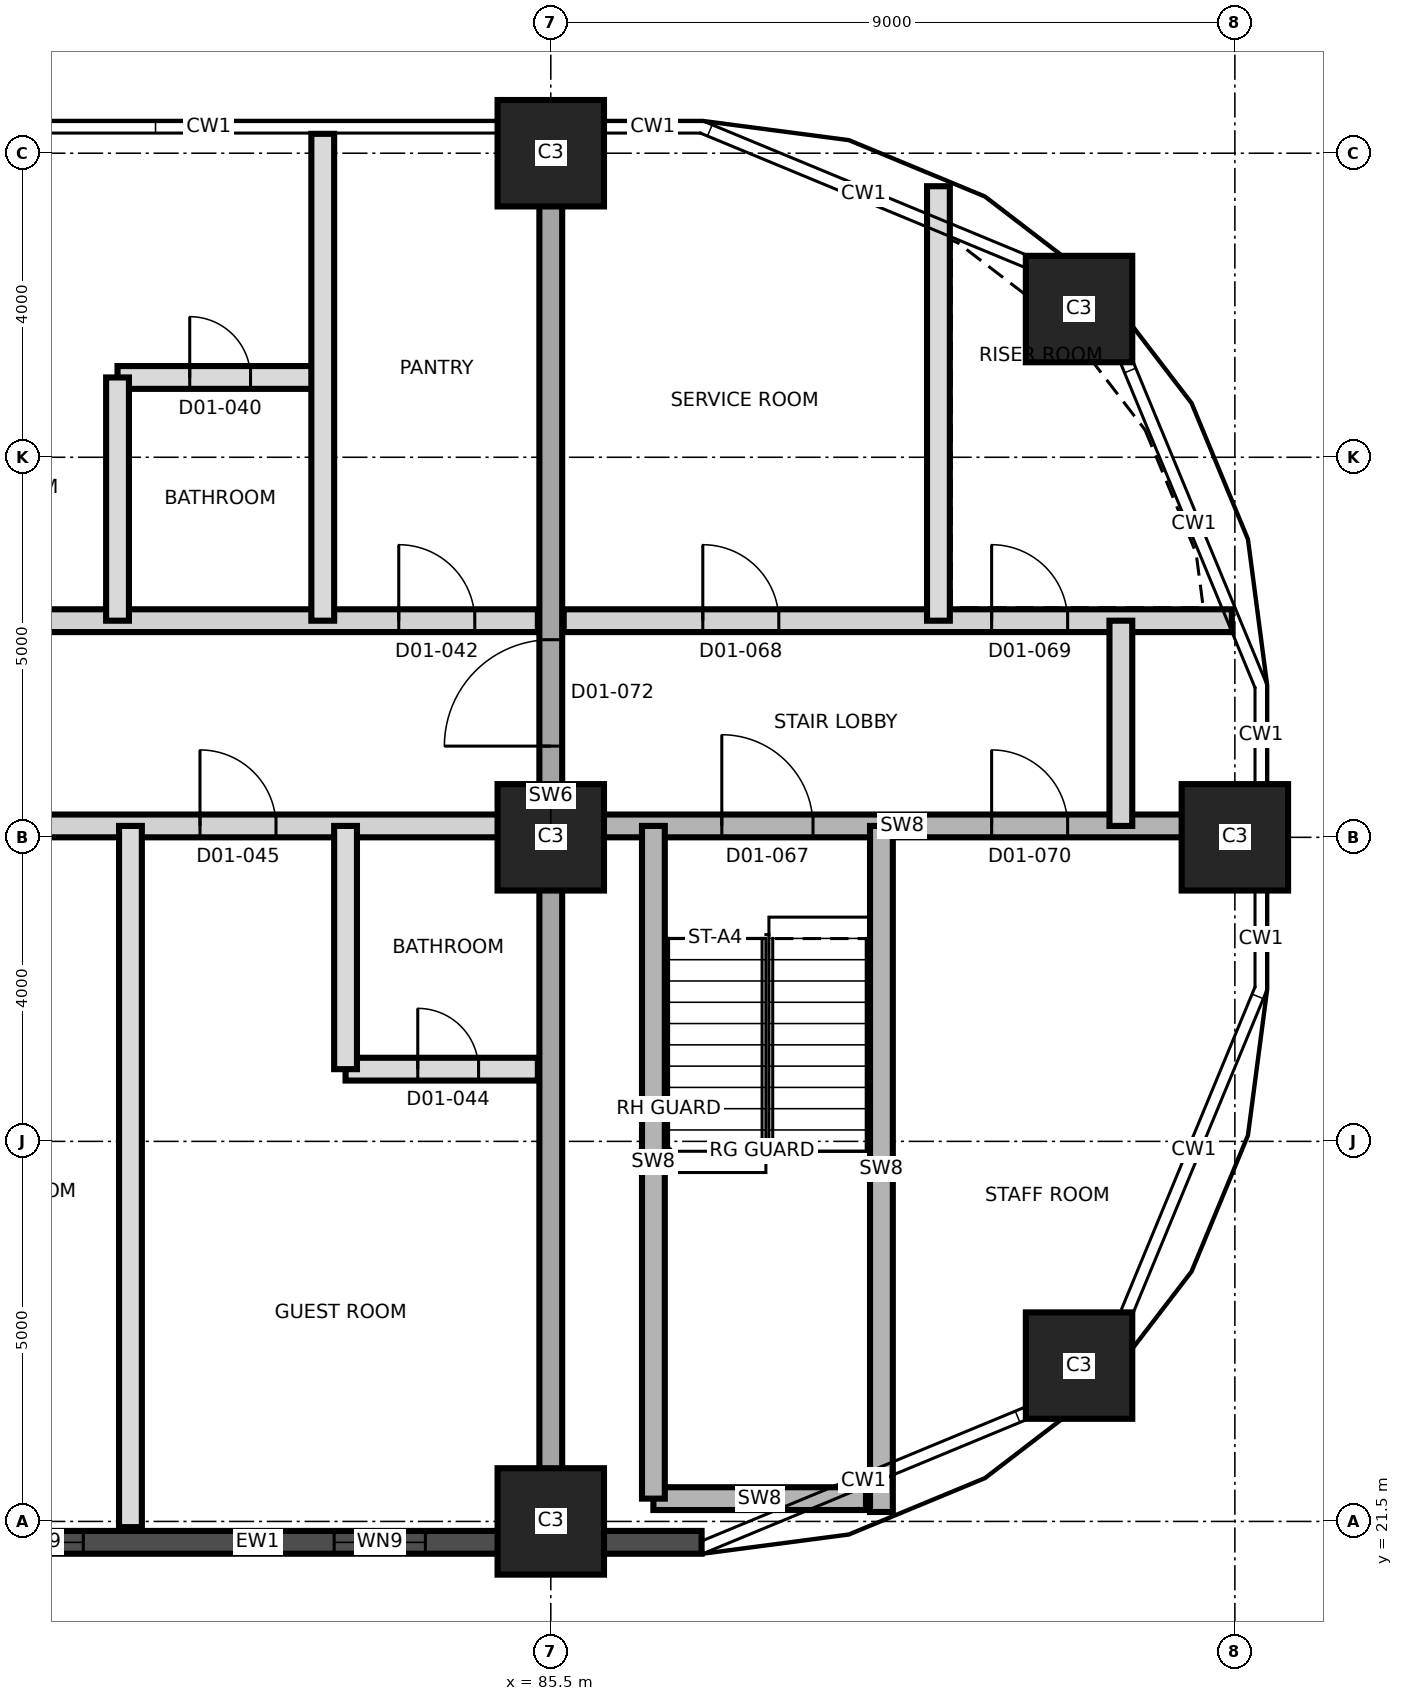
"""IFC4 building model, lengths in metres.
Left out: names, types, materials, properties, quantities, classifications, styles, units other than length and angle.
Written with IfcOpenShell. Run it as: python <this file> out.ifc"""

import sys

from ifc_helpers import new_model, si_unit, direction, frame, frame_2d, origin, origin_2d, place, context, subcontext, project, spatial, rectangle, extrude, element, fill, save


model = new_model("IFC4")
c1 = context("Model", 3, precision=1e-05, world=origin(), true_north=direction((0.0, 1.0)))
c2 = subcontext(c1, "Body", "Model", "MODEL_VIEW")
j1 = project(units=[si_unit("LENGTHUNIT", "METRE"), si_unit("PLANEANGLEUNIT", "RADIAN")], contexts=[c1])
p1 = place(None, origin())
s1 = spatial("IfcSite", under=j1, at=p1, CompositionType="ELEMENT")
p2 = place(p1, origin())
s2 = spatial("IfcBuilding", under=s1, at=p2, CompositionType="ELEMENT")
p3 = place(p2, frame((0.0, 0.0, 40.9)))
s3 = spatial("IfcBuildingStorey", under=s2, at=p3, CompositionType="ELEMENT", Elevation=40.9)
for number, where, z_axis, x_axis in (
    (1, (85.5, 21.5, 0.0), (0.0, 0.0, 1.0), (1.0, 0.0, 0.0)),
    (2, (92.45, 23.55, 0.0), (0.0, 0.0, 1.0), (1.0, 0.0, 0.0)),
    (3, (85.5, 30.5, 0.0), (0.0, 0.0, 1.0), (1.0, 0.0, 0.0)),
    (4, (94.5, 30.5, 0.0), (0.0, 0.0, 1.0), (1.0, 0.0, 0.0)),
    (5, (92.45, 37.45, 0.0), (0.0, 0.0, 1.0), (1.0, 0.0, 0.0)),
    (6, (85.5, 39.5, 0.0), (0.0, 0.0, 1.0), (1.0, 0.0, 0.0)),
):
    element("IfcColumn", number, at=place(p3, frame(where, z_axis=z_axis, x_axis=x_axis)), inside=s3, PredefinedType="COLUMN", context=c2, shape_type="SweptSolid", body=[
        extrude(rectangle(XDim=1.4, YDim=1.4, at=origin_2d()), origin(), (0.0, 0.0, 1.0), 3.7),
    ])
p4 = place(p3, frame((85.5, 21.425, 0.0), z_axis=(0.0, 0.0, 1.0), x_axis=(0.0, 1.0, 0.0)))
e7 = element("IfcWall", 7, at=p4, inside=s3, PredefinedType="SHEAR", context=c2, shape_type="SweptSolid", body=[
    extrude(rectangle(XDim=18.15, YDim=0.3, at=frame_2d((9.075, 0.0))), origin(), (0.0, 0.0, 1.0), 3.7),
])
p5 = place(p4, frame((10.275, 0.0, 0.0)))
e8 = element("IfcOpeningElement", 8, at=p5, cuts=e7, PredefinedType="OPENING", context=c2, shape_type="SweptSolid", body=[
    extrude(rectangle(XDim=1.4, YDim=2.1, at=frame_2d((0.7, 1.05))), frame((0.0, 0.16, 0.0), z_axis=(0.0, -1.0, 0.0), x_axis=(1.0, 0.0, 0.0)), (0.0, 0.0, 1.0), 0.32),
])
p6 = place(p3, frame((75.8, 21.225, 0.0), z_axis=(0.0, 0.0, 1.0), x_axis=(1.0, 0.0, 0.0)))
e9 = element("IfcWall", 9, at=p6, inside=s3, PredefinedType="SOLIDWALL", context=c2, shape_type="SweptSolid", body=[
    extrude(rectangle(XDim=11.684, YDim=0.3, at=frame_2d((5.842, 0.0))), origin(), (0.0, 0.0, 1.0), 3.4),
])
p7 = place(p6, frame((2.35, 0.0, 0.9)))
e10 = element("IfcOpeningElement", 10, at=p7, cuts=e9, PredefinedType="OPENING", context=c2, shape_type="SweptSolid", body=[
    extrude(rectangle(XDim=1.2, YDim=1.5, at=frame_2d((0.6, 0.75))), frame((0.0, 0.16, 0.0), z_axis=(0.0, -1.0, 0.0), x_axis=(1.0, 0.0, 0.0)), (0.0, 0.0, 1.0), 0.32),
])
p8 = place(p6, frame((6.85, 0.0, 0.9)))
e11 = element("IfcOpeningElement", 11, at=p8, cuts=e9, PredefinedType="OPENING", context=c2, shape_type="SweptSolid", body=[
    extrude(rectangle(XDim=1.2, YDim=1.5, at=frame_2d((0.6, 0.75))), frame((0.0, 0.16, 0.0), z_axis=(0.0, -1.0, 0.0), x_axis=(1.0, 0.0, 0.0)), (0.0, 0.0, 1.0), 0.32),
])
p9 = place(p3, frame((86.85, 21.8, 0.0), z_axis=(0.0, 0.0, 1.0), x_axis=(1.0, 0.0, 0.0)))
e12 = element("IfcWall", 12, at=p9, inside=s3, PredefinedType="SHEAR", context=c2, shape_type="SweptSolid", body=[
    extrude(rectangle(XDim=2.797, YDim=0.3, at=frame_2d((1.398, 0.0))), origin(), (0.0, 0.0, 1.0), 3.4),
])
p10 = place(p3, frame((82.8, 27.45, 0.0), z_axis=(0.0, 0.0, 1.0), x_axis=(1.0, 0.0, 0.0)))
e13 = element("IfcWall", 13, at=p10, inside=s3, PredefinedType="PARTITIONING", context=c2, shape_type="SweptSolid", body=[
    extrude(rectangle(XDim=2.53, YDim=0.3, at=frame_2d((1.265, 0.0))), origin(), (0.0, 0.0, 1.0), 3.4),
])
p11 = place(p10, frame((0.95, 0.0, 0.0)))
e14 = element("IfcOpeningElement", 14, at=p11, cuts=e13, PredefinedType="OPENING", context=c2, shape_type="SweptSolid", body=[
    extrude(rectangle(XDim=0.8, YDim=2.1, at=frame_2d((0.4, 1.05))), frame((0.0, 0.16, 0.0), z_axis=(0.0, -1.0, 0.0), x_axis=(1.0, 0.0, 0.0)), (0.0, 0.0, 1.0), 0.32),
])
p12 = place(p3, frame((58.95, 30.65, 0.0), z_axis=(0.0, 0.0, 1.0), x_axis=(1.0, 0.0, 0.0)))
e15 = element("IfcWall", 15, at=p12, inside=s3, PredefinedType="PARTITIONING", context=c2, shape_type="SweptSolid", body=[
    extrude(rectangle(XDim=26.38, YDim=0.3, at=frame_2d((13.19, 0.0))), origin(), (0.0, 0.0, 1.0), 3.4),
])
p13 = place(p12, frame((2.47, 0.0, 0.0)))
e16 = element("IfcOpeningElement", 16, at=p13, cuts=e15, PredefinedType="OPENING", context=c2, shape_type="SweptSolid", body=[
    extrude(rectangle(XDim=1.0, YDim=2.1, at=frame_2d((0.5, 1.05))), frame((0.0, 0.16, 0.0), z_axis=(0.0, -1.0, 0.0), x_axis=(1.0, 0.0, 0.0)), (0.0, 0.0, 1.0), 0.32),
])
p14 = place(p12, frame((4.27, 0.0, 0.0)))
e17 = element("IfcOpeningElement", 17, at=p14, cuts=e15, PredefinedType="OPENING", context=c2, shape_type="SweptSolid", body=[
    extrude(rectangle(XDim=1.0, YDim=2.1, at=frame_2d((0.5, 1.05))), frame((0.0, 0.16, 0.0), z_axis=(0.0, -1.0, 0.0), x_axis=(1.0, 0.0, 0.0)), (0.0, 0.0, 1.0), 0.32),
])
p15 = place(p12, frame((11.8, 0.0, 0.0)))
e18 = element("IfcOpeningElement", 18, at=p15, cuts=e15, PredefinedType="OPENING", context=c2, shape_type="SweptSolid", body=[
    extrude(rectangle(XDim=1.0, YDim=2.4, at=frame_2d((0.5, 1.2))), frame((0.0, 0.16, 0.0), z_axis=(0.0, -1.0, 0.0), x_axis=(1.0, 0.0, 0.0)), (0.0, 0.0, 1.0), 0.32),
])
p16 = place(p12, frame((13.3, 0.0, 0.0)))
e19 = element("IfcOpeningElement", 19, at=p16, cuts=e15, PredefinedType="OPENING", context=c2, shape_type="SweptSolid", body=[
    extrude(rectangle(XDim=1.0, YDim=2.4, at=frame_2d((0.5, 1.2))), frame((0.0, 0.16, 0.0), z_axis=(0.0, -1.0, 0.0), x_axis=(1.0, 0.0, 0.0)), (0.0, 0.0, 1.0), 0.32),
])
p17 = place(p12, frame((18.685, 0.0, 0.0)))
e20 = element("IfcOpeningElement", 20, at=p17, cuts=e15, PredefinedType="OPENING", context=c2, shape_type="SweptSolid", body=[
    extrude(rectangle(XDim=1.2, YDim=2.1, at=frame_2d((0.6, 1.05))), frame((0.0, 0.16, 0.0), z_axis=(0.0, -1.0, 0.0), x_axis=(1.0, 0.0, 0.0)), (0.0, 0.0, 1.0), 0.32),
])
p18 = place(p12, frame((21.935, 0.0, 0.0)))
e21 = element("IfcOpeningElement", 21, at=p18, cuts=e15, PredefinedType="OPENING", context=c2, shape_type="SweptSolid", body=[
    extrude(rectangle(XDim=1.0, YDim=2.1, at=frame_2d((0.5, 1.05))), frame((0.0, 0.16, 0.0), z_axis=(0.0, -1.0, 0.0), x_axis=(1.0, 0.0, 0.0)), (0.0, 0.0, 1.0), 0.32),
])
p19 = place(p3, frame((85.67, 30.65, 0.0), z_axis=(0.0, 0.0, 1.0), x_axis=(1.0, 0.0, 0.0)))
e22 = element("IfcWall", 22, at=p19, inside=s3, PredefinedType="SHEAR", context=c2, shape_type="SweptSolid", body=[
    extrude(rectangle(XDim=8.905, YDim=0.3, at=frame_2d((4.453, 0.0))), origin(), (0.0, 0.0, 1.0), 3.4),
])
p20 = place(p19, frame((2.08, 0.0, 0.0)))
e23 = element("IfcOpeningElement", 23, at=p20, cuts=e22, PredefinedType="OPENING", context=c2, shape_type="SweptSolid", body=[
    extrude(rectangle(XDim=1.2, YDim=2.1, at=frame_2d((0.6, 1.05))), frame((0.0, 0.16, 0.0), z_axis=(0.0, -1.0, 0.0), x_axis=(1.0, 0.0, 0.0)), (0.0, 0.0, 1.0), 0.32),
])
p21 = place(p19, frame((5.63, 0.0, 0.0)))
e24 = element("IfcOpeningElement", 24, at=p21, cuts=e22, PredefinedType="OPENING", context=c2, shape_type="SweptSolid", body=[
    extrude(rectangle(XDim=1.0, YDim=2.1, at=frame_2d((0.5, 1.05))), frame((0.0, 0.16, 0.0), z_axis=(0.0, -1.0, 0.0), x_axis=(1.0, 0.0, 0.0)), (0.0, 0.0, 1.0), 0.32),
])
p22 = place(p3, frame((58.95, 33.35, 0.0), z_axis=(0.0, 0.0, 1.0), x_axis=(1.0, 0.0, 0.0)))
e25 = element("IfcWall", 25, at=p22, inside=s3, PredefinedType="PARTITIONING", context=c2, shape_type="SweptSolid", body=[
    extrude(rectangle(XDim=26.38, YDim=0.3, at=frame_2d((13.19, 0.0))), origin(), (0.0, 0.0, 1.0), 3.4),
])
p23 = place(p22, frame((1.9, 0.0, 0.0)))
e26 = element("IfcOpeningElement", 26, at=p23, cuts=e25, PredefinedType="OPENING", context=c2, shape_type="SweptSolid", body=[
    extrude(rectangle(XDim=1.0, YDim=2.4, at=frame_2d((0.5, 1.2))), frame((0.0, 0.16, 0.0), z_axis=(0.0, -1.0, 0.0), x_axis=(1.0, 0.0, 0.0)), (0.0, 0.0, 1.0), 0.32),
])
p24 = place(p22, frame((9.7, 0.0, 0.0)))
e27 = element("IfcOpeningElement", 27, at=p24, cuts=e25, PredefinedType="OPENING", context=c2, shape_type="SweptSolid", body=[
    extrude(rectangle(XDim=1.0, YDim=2.1, at=frame_2d((0.5, 1.05))), frame((0.0, 0.16, 0.0), z_axis=(0.0, -1.0, 0.0), x_axis=(1.0, 0.0, 0.0)), (0.0, 0.0, 1.0), 0.32),
])
p25 = place(p22, frame((15.55, 0.0, 0.0)))
e28 = element("IfcOpeningElement", 28, at=p25, cuts=e25, PredefinedType="OPENING", context=c2, shape_type="SweptSolid", body=[
    extrude(rectangle(XDim=1.0, YDim=2.1, at=frame_2d((0.5, 1.05))), frame((0.0, 0.16, 0.0), z_axis=(0.0, -1.0, 0.0), x_axis=(1.0, 0.0, 0.0)), (0.0, 0.0, 1.0), 0.32),
])
p26 = place(p22, frame((18.7, 0.0, 0.0)))
e29 = element("IfcOpeningElement", 29, at=p26, cuts=e25, PredefinedType="OPENING", context=c2, shape_type="SweptSolid", body=[
    extrude(rectangle(XDim=1.0, YDim=2.1, at=frame_2d((0.5, 1.05))), frame((0.0, 0.16, 0.0), z_axis=(0.0, -1.0, 0.0), x_axis=(1.0, 0.0, 0.0)), (0.0, 0.0, 1.0), 0.32),
])
p27 = place(p22, frame((24.55, 0.0, 0.0)))
e30 = element("IfcOpeningElement", 30, at=p27, cuts=e25, PredefinedType="OPENING", context=c2, shape_type="SweptSolid", body=[
    extrude(rectangle(XDim=1.0, YDim=2.1, at=frame_2d((0.5, 1.05))), frame((0.0, 0.16, 0.0), z_axis=(0.0, -1.0, 0.0), x_axis=(1.0, 0.0, 0.0)), (0.0, 0.0, 1.0), 0.32),
])
p28 = place(p3, frame((85.67, 33.35, 0.0), z_axis=(0.0, 0.0, 1.0), x_axis=(1.0, 0.0, 0.0)))
e31 = element("IfcWall", 31, at=p28, inside=s3, PredefinedType="PARTITIONING", context=c2, shape_type="SweptSolid", body=[
    extrude(rectangle(XDim=8.79, YDim=0.3, at=frame_2d((4.395, 0.0))), origin(), (0.0, 0.0, 1.0), 3.4),
])
p29 = place(p28, frame((1.83, 0.0, 0.0)))
e32 = element("IfcOpeningElement", 32, at=p29, cuts=e31, PredefinedType="OPENING", context=c2, shape_type="SweptSolid", body=[
    extrude(rectangle(XDim=1.0, YDim=2.1, at=frame_2d((0.5, 1.05))), frame((0.0, 0.16, 0.0), z_axis=(0.0, -1.0, 0.0), x_axis=(1.0, 0.0, 0.0)), (0.0, 0.0, 1.0), 0.32),
])
p30 = place(p28, frame((5.63, 0.0, 0.0)))
e33 = element("IfcOpeningElement", 33, at=p30, cuts=e31, PredefinedType="OPENING", context=c2, shape_type="SweptSolid", body=[
    extrude(rectangle(XDim=1.0, YDim=2.1, at=frame_2d((0.5, 1.05))), frame((0.0, 0.16, 0.0), z_axis=(0.0, -1.0, 0.0), x_axis=(1.0, 0.0, 0.0)), (0.0, 0.0, 1.0), 0.32),
])
p31 = place(p3, frame((79.8, 36.55, 0.0), z_axis=(0.0, 0.0, 1.0), x_axis=(1.0, 0.0, 0.0)))
e34 = element("IfcWall", 34, at=p31, inside=s3, PredefinedType="PARTITIONING", context=c2, shape_type="SweptSolid", body=[
    extrude(rectangle(XDim=2.7, YDim=0.3, at=frame_2d((1.35, 0.0))), origin(), (0.0, 0.0, 1.0), 3.4),
])
p32 = place(p31, frame((0.95, 0.0, 0.0)))
e35 = element("IfcOpeningElement", 35, at=p32, cuts=e34, PredefinedType="OPENING", context=c2, shape_type="SweptSolid", body=[
    extrude(rectangle(XDim=0.8, YDim=2.1, at=frame_2d((0.4, 1.05))), frame((0.0, 0.16, 0.0), z_axis=(0.0, -1.0, 0.0), x_axis=(1.0, 0.0, 0.0)), (0.0, 0.0, 1.0), 0.32),
])
p33 = place(p3, frame((79.8, 33.35, 0.0), z_axis=(0.0, 0.0, 1.0), x_axis=(0.0, 1.0, 0.0)))
e36 = element("IfcWall", 36, at=p33, inside=s3, PredefinedType="PARTITIONING", context=c2, shape_type="SweptSolid", body=[
    extrude(rectangle(XDim=3.2, YDim=0.3, at=frame_2d((1.6, 0.0))), origin(), (0.0, 0.0, 1.0), 3.4),
])
p34 = place(p3, frame((79.97, 21.425, 0.0), z_axis=(0.0, 0.0, 1.0), x_axis=(0.0, 1.0, 0.0)))
e37 = element("IfcWall", 37, at=p34, inside=s3, PredefinedType="PARTITIONING", context=c2, shape_type="SweptSolid", body=[
    extrude(rectangle(XDim=9.225, YDim=0.3, at=frame_2d((4.612, 0.0))), origin(), (0.0, 0.0, 1.0), 3.4),
])
p35 = place(p3, frame((82.5, 33.35, 0.0), z_axis=(0.0, 0.0, 1.0), x_axis=(0.0, 1.0, 0.0)))
e38 = element("IfcWall", 38, at=p35, inside=s3, PredefinedType="PARTITIONING", context=c2, shape_type="SweptSolid", body=[
    extrude(rectangle(XDim=6.405, YDim=0.3, at=frame_2d((3.202, 0.0))), origin(), (0.0, 0.0, 1.0), 3.4),
])
p36 = place(p3, frame((82.8, 27.45, 0.0), z_axis=(0.0, 0.0, 1.0), x_axis=(0.0, 1.0, 0.0)))
e39 = element("IfcWall", 39, at=p36, inside=s3, PredefinedType="PARTITIONING", context=c2, shape_type="SweptSolid", body=[
    extrude(rectangle(XDim=3.2, YDim=0.3, at=frame_2d((1.6, 0.0))), origin(), (0.0, 0.0, 1.0), 3.4),
])
p37 = place(p3, frame((86.85, 21.8, 0.0), z_axis=(0.0, 0.0, 1.0), x_axis=(0.0, 1.0, 0.0)))
e40 = element("IfcWall", 40, at=p37, inside=s3, PredefinedType="SHEAR", context=c2, shape_type="SweptSolid", body=[
    extrude(rectangle(XDim=8.85, YDim=0.3, at=frame_2d((4.425, 0.0))), origin(), (0.0, 0.0, 1.0), 3.4),
])
p38 = place(p3, frame((89.85, 21.624, 0.0), z_axis=(0.0, 0.0, 1.0), x_axis=(0.0, 1.0, 0.0)))
e41 = element("IfcWall", 41, at=p38, inside=s3, PredefinedType="SHEAR", context=c2, shape_type="SweptSolid", body=[
    extrude(rectangle(XDim=9.026, YDim=0.3, at=frame_2d((4.513, 0.0))), origin(), (0.0, 0.0, 1.0), 3.4),
])
p39 = place(p3, frame((90.6, 33.35, 0.0), z_axis=(0.0, 0.0, 1.0), x_axis=(0.0, 1.0, 0.0)))
e42 = element("IfcWall", 42, at=p39, inside=s3, PredefinedType="PARTITIONING", context=c2, shape_type="SweptSolid", body=[
    extrude(rectangle(XDim=5.716, YDim=0.3, at=frame_2d((2.858, 0.0))), origin(), (0.0, 0.0, 1.0), 3.4),
])
p40 = place(p3, frame((93.0, 30.65, 0.0), z_axis=(0.0, 0.0, 1.0), x_axis=(0.0, 1.0, 0.0)))
e43 = element("IfcWall", 43, at=p40, inside=s3, PredefinedType="PARTITIONING", context=c2, shape_type="SweptSolid", body=[
    extrude(rectangle(XDim=2.7, YDim=0.3, at=frame_2d((1.35, 0.0))), origin(), (0.0, 0.0, 1.0), 3.4),
])
p41 = place(p7, origin())
e44 = element("IfcWindow", 44, at=p41, inside=s3, PartitioningType="SINGLE_PANEL", PredefinedType="WINDOW", context=c2, shape_type="SweptSolid", body=[
    extrude(rectangle(XDim=1.2, YDim=1.5, at=frame_2d((0.6, 0.75))), frame((0.0, 0.03, 0.0), z_axis=(0.0, -1.0, 0.0), x_axis=(1.0, 0.0, 0.0)), (0.0, 0.0, 1.0), 0.06),
])
fill(e10, e44)
p42 = place(p8, origin())
e45 = element("IfcWindow", 45, at=p42, inside=s3, PartitioningType="SINGLE_PANEL", PredefinedType="WINDOW", context=c2, shape_type="SweptSolid", body=[
    extrude(rectangle(XDim=1.2, YDim=1.5, at=frame_2d((0.6, 0.75))), frame((0.0, 0.03, 0.0), z_axis=(0.0, -1.0, 0.0), x_axis=(1.0, 0.0, 0.0)), (0.0, 0.0, 1.0), 0.06),
])
fill(e11, e45)
p43 = place(p32, origin())
e46 = element("IfcDoor", 46, at=p43, inside=s3, OperationType="SINGLE_SWING_RIGHT", PredefinedType="DOOR", context=c2, shape_type="SweptSolid", body=[
    extrude(rectangle(XDim=0.8, YDim=2.1, at=frame_2d((0.4, 1.05))), frame((0.0, 0.025, 0.0), z_axis=(0.0, -1.0, 0.0), x_axis=(1.0, 0.0, 0.0)), (0.0, 0.0, 1.0), 0.05),
])
fill(e35, e46)
p44 = place(p27, origin())
e47 = element("IfcDoor", 47, at=p44, inside=s3, OperationType="SINGLE_SWING_LEFT", PredefinedType="DOOR", context=c2, shape_type="SweptSolid", body=[
    extrude(rectangle(XDim=1.0, YDim=2.1, at=frame_2d((0.5, 1.05))), frame((0.0, 0.025, 0.0), z_axis=(0.0, -1.0, 0.0), x_axis=(1.0, 0.0, 0.0)), (0.0, 0.0, 1.0), 0.05),
])
fill(e30, e47)
p45 = place(p11, origin())
e48 = element("IfcDoor", 48, at=p45, inside=s3, OperationType="SINGLE_SWING_LEFT", PredefinedType="DOOR", context=c2, shape_type="SweptSolid", body=[
    extrude(rectangle(XDim=0.8, YDim=2.1, at=frame_2d((0.4, 1.05))), frame((0.0, 0.025, 0.0), z_axis=(0.0, -1.0, 0.0), x_axis=(1.0, 0.0, 0.0)), (0.0, 0.0, 1.0), 0.05),
])
fill(e14, e48)
p46 = place(p18, origin())
e49 = element("IfcDoor", 49, at=p46, inside=s3, OperationType="SINGLE_SWING_RIGHT", PredefinedType="DOOR", context=c2, shape_type="SweptSolid", body=[
    extrude(rectangle(XDim=1.0, YDim=2.1, at=frame_2d((0.5, 1.05))), frame((0.0, 0.025, 0.0), z_axis=(0.0, -1.0, 0.0), x_axis=(1.0, 0.0, 0.0)), (0.0, 0.0, 1.0), 0.05),
])
fill(e21, e49)
p47 = place(p20, origin())
e50 = element("IfcDoor", 50, at=p47, inside=s3, OperationType="SINGLE_SWING_LEFT", PredefinedType="DOOR", context=c2, shape_type="SweptSolid", body=[
    extrude(rectangle(XDim=1.2, YDim=2.1, at=frame_2d((0.6, 1.05))), frame((0.0, 0.025, 0.0), z_axis=(0.0, -1.0, 0.0), x_axis=(1.0, 0.0, 0.0)), (0.0, 0.0, 1.0), 0.05),
])
fill(e23, e50)
p48 = place(p29, origin())
e51 = element("IfcDoor", 51, at=p48, inside=s3, OperationType="SINGLE_SWING_LEFT", PredefinedType="DOOR", context=c2, shape_type="SweptSolid", body=[
    extrude(rectangle(XDim=1.0, YDim=2.1, at=frame_2d((0.5, 1.05))), frame((0.0, 0.025, 0.0), z_axis=(0.0, -1.0, 0.0), x_axis=(1.0, 0.0, 0.0)), (0.0, 0.0, 1.0), 0.05),
])
fill(e32, e51)
p49 = place(p30, origin())
e52 = element("IfcDoor", 52, at=p49, inside=s3, OperationType="SINGLE_SWING_RIGHT", PredefinedType="DOOR", context=c2, shape_type="SweptSolid", body=[
    extrude(rectangle(XDim=1.0, YDim=2.1, at=frame_2d((0.5, 1.05))), frame((0.0, 0.025, 0.0), z_axis=(0.0, -1.0, 0.0), x_axis=(1.0, 0.0, 0.0)), (0.0, 0.0, 1.0), 0.05),
])
fill(e33, e52)
p50 = place(p21, origin())
e53 = element("IfcDoor", 53, at=p50, inside=s3, OperationType="SINGLE_SWING_LEFT", PredefinedType="DOOR", context=c2, shape_type="SweptSolid", body=[
    extrude(rectangle(XDim=1.0, YDim=2.1, at=frame_2d((0.5, 1.05))), frame((0.0, 0.025, 0.0), z_axis=(0.0, -1.0, 0.0), x_axis=(1.0, 0.0, 0.0)), (0.0, 0.0, 1.0), 0.05),
])
fill(e24, e53)
p51 = place(p5, origin())
e54 = element("IfcDoor", 54, at=p51, inside=s3, OperationType="SINGLE_SWING_RIGHT", PredefinedType="DOOR", context=c2, shape_type="SweptSolid", body=[
    extrude(rectangle(XDim=1.4, YDim=2.1, at=frame_2d((0.7, 1.05))), frame((0.0, 0.025, 0.0), z_axis=(0.0, -1.0, 0.0), x_axis=(1.0, 0.0, 0.0)), (0.0, 0.0, 1.0), 0.05),
])
fill(e8, e54)
save(model, sys.argv[1])
